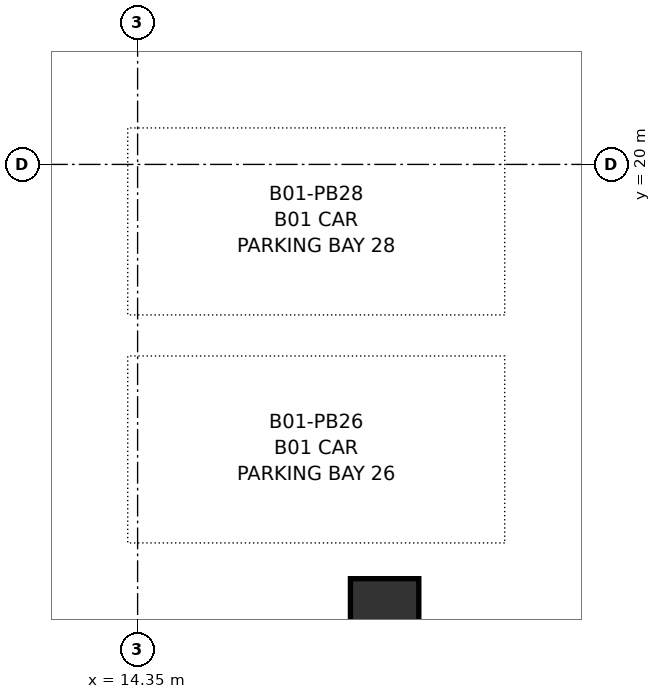
"""IFC4 building model, lengths in metres.
Left out: names, types, materials, properties, quantities, classifications, styles, units other than length and angle.
Written with IfcOpenShell. Run it as: python <this file> out.ifc"""

import sys

from ifc_helpers import new_model, si_unit, direction, frame, origin, origin_2d, place, context, subcontext, project, spatial, rectangle, extrude, source, transform, mapped, element, save


model = new_model("IFC4")
c1 = context("Model", 3, precision=1e-05, world=origin(), true_north=direction((0.0, 1.0)))
c2 = subcontext(c1, "Body", "Model", "MODEL_VIEW")
j1 = project(units=[si_unit("LENGTHUNIT", "METRE"), si_unit("PLANEANGLEUNIT", "RADIAN")], contexts=[c1])
p1 = place(None, origin())
s1 = spatial("IfcSite", under=j1, at=p1, CompositionType="ELEMENT")
p2 = place(p1, origin())
s2 = spatial("IfcBuilding", under=s1, at=p2, CompositionType="ELEMENT")
p3 = place(p2, frame((0.0, 0.0, -4.2)))
s3 = spatial("IfcBuildingStorey", under=s2, at=p3, CompositionType="ELEMENT", Elevation=-4.2)
m1 = source(origin(), c2, "Body", "SweptSolid", [
    extrude(rectangle(XDim=0.9, YDim=0.9, at=origin_2d()), origin(), (0.0, 0.0, 1.0), 3.9),
])
p4 = place(p3, frame((17.6, 14.1, 0.0), z_axis=(0.0, 0.0, 1.0), x_axis=(1.0, 0.0, 0.0)))
e1 = element("IfcColumn", 1, at=p4, inside=s3, PredefinedType="COLUMN", context=c2, shape_type="MappedRepresentation", body=[
    mapped(m1, transform((0.0, 0.0, 0.0), x_axis=(1.0, 0.0, 0.0), y_axis=(0.0, 1.0, 0.0), z_axis=(0.0, 0.0, 1.0), scale=1.0)),
])
save(model, sys.argv[1])
